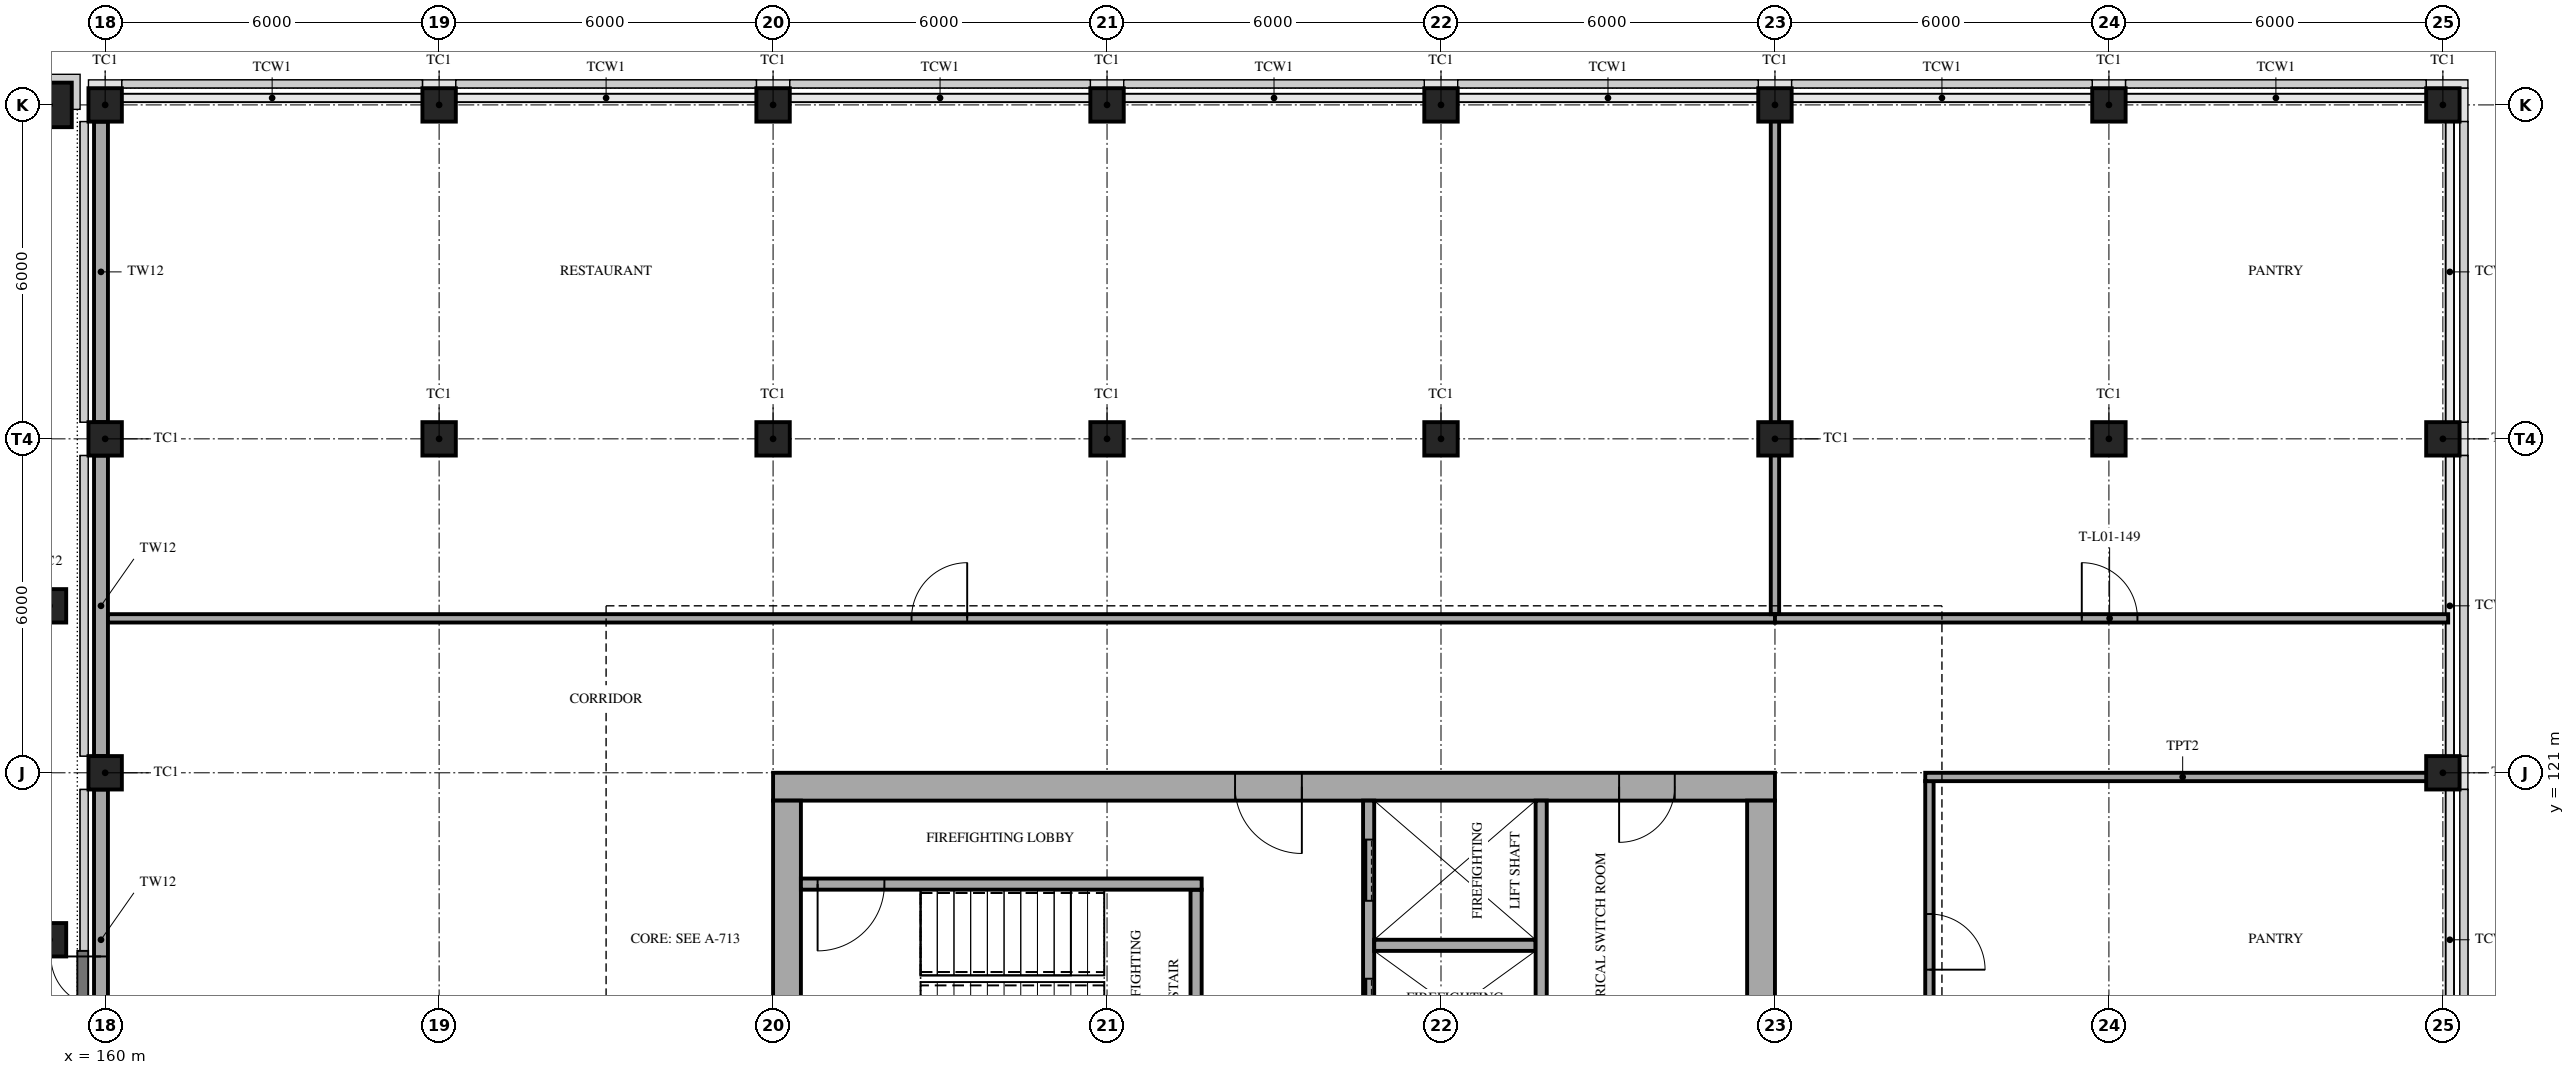
"""IFC4 building model, lengths in metres.
Left out: names, types, materials, properties, quantities, classifications, styles, units other than length and angle.
Written with IfcOpenShell. Run it as: python <this file> out.ifc"""

import sys

from ifc_helpers import new_model, si_unit, direction, frame, frame_2d, origin, origin_2d, place, context, subcontext, project, spatial, rectangle, hollow_rectangle, extrude, element, fill, save


model = new_model("IFC4")
c1 = context("Model", 3, precision=1e-05, world=origin(), true_north=direction((0.0, 1.0)))
c2 = subcontext(c1, "Body", "Model", "MODEL_VIEW")
j1 = project(units=[si_unit("LENGTHUNIT", "METRE"), si_unit("PLANEANGLEUNIT", "RADIAN")], contexts=[c1])
p1 = place(None, origin())
s1 = spatial("IfcSite", under=j1, at=p1, CompositionType="ELEMENT")
p2 = place(p1, origin())
s2 = spatial("IfcBuilding", under=s1, at=p2, CompositionType="ELEMENT")
p3 = place(p2, frame((0.0, 0.0, 5.0)))
s3 = spatial("IfcBuildingStorey", under=s2, at=p3, CompositionType="ELEMENT", Elevation=5.0)
for number, where, z_axis, x_axis in (
    (1, (160.0, 121.0, 0.0), (0.0, 0.0, 1.0), (1.0, 0.0, 0.0)),
    (2, (160.0, 127.0, 0.0), (0.0, 0.0, 1.0), (1.0, 0.0, 0.0)),
    (3, (160.0, 133.0, 0.0), (0.0, 0.0, 1.0), (1.0, 0.0, 0.0)),
    (4, (166.0, 133.0, 0.0), (0.0, 0.0, 1.0), (1.0, 0.0, 0.0)),
    (5, (172.0, 133.0, 0.0), (0.0, 0.0, 1.0), (1.0, 0.0, 0.0)),
    (6, (178.0, 133.0, 0.0), (0.0, 0.0, 1.0), (1.0, 0.0, 0.0)),
    (7, (184.0, 133.0, 0.0), (0.0, 0.0, 1.0), (1.0, 0.0, 0.0)),
    (8, (190.0, 133.0, 0.0), (0.0, 0.0, 1.0), (1.0, 0.0, 0.0)),
    (9, (196.0, 133.0, 0.0), (0.0, 0.0, 1.0), (1.0, 0.0, 0.0)),
    (10, (202.0, 121.0, 0.0), (0.0, 0.0, 1.0), (1.0, 0.0, 0.0)),
    (11, (202.0, 127.0, 0.0), (0.0, 0.0, 1.0), (1.0, 0.0, 0.0)),
    (12, (202.0, 133.0, 0.0), (0.0, 0.0, 1.0), (1.0, 0.0, 0.0)),
    (13, (166.0, 127.0, 0.0), (0.0, 0.0, 1.0), (1.0, 0.0, 0.0)),
    (14, (172.0, 127.0, 0.0), (0.0, 0.0, 1.0), (1.0, 0.0, 0.0)),
    (15, (178.0, 127.0, 0.0), (0.0, 0.0, 1.0), (1.0, 0.0, 0.0)),
    (16, (184.0, 127.0, 0.0), (0.0, 0.0, 1.0), (1.0, 0.0, 0.0)),
    (17, (190.0, 127.0, 0.0), (0.0, 0.0, 1.0), (1.0, 0.0, 0.0)),
    (18, (196.0, 127.0, 0.0), (0.0, 0.0, 1.0), (1.0, 0.0, 0.0)),
):
    element("IfcColumn", number, at=place(p3, frame(where, z_axis=z_axis, x_axis=x_axis)), inside=s3, PredefinedType="COLUMN", context=c2, shape_type="SweptSolid", body=[
        extrude(hollow_rectangle(XDim=0.6, YDim=0.6, WallThickness=0.04, at=origin_2d()), origin(), (0.0, 0.0, 1.0), 5.0),
    ])
p4 = place(p3, frame((172.0, 120.75, 0.0), z_axis=(0.0, 0.0, 1.0), x_axis=(1.0, 0.0, 0.0)))
e19 = element("IfcWall", 19, at=p4, inside=s3, PredefinedType="SHEAR", context=c2, shape_type="SweptSolid", body=[
    extrude(rectangle(XDim=18.0, YDim=0.5, at=frame_2d((9.0, 0.0))), origin(), (0.0, 0.0, 1.0), 5.0),
])
p5 = place(p4, frame((8.3, 0.0, 0.0)))
e20 = element("IfcOpeningElement", 20, at=p5, cuts=e19, PredefinedType="OPENING", context=c2, shape_type="SweptSolid", body=[
    extrude(rectangle(XDim=1.2, YDim=2.1, at=frame_2d((0.6, 1.05))), frame((0.0, 0.26, 0.0), z_axis=(0.0, -1.0, 0.0), x_axis=(1.0, 0.0, 0.0)), (0.0, 0.0, 1.0), 0.52),
])
p6 = place(p4, frame((15.2, 0.0, 0.0)))
e21 = element("IfcOpeningElement", 21, at=p6, cuts=e19, PredefinedType="OPENING", context=c2, shape_type="SweptSolid", body=[
    extrude(rectangle(XDim=1.0, YDim=2.1, at=frame_2d((0.5, 1.05))), frame((0.0, 0.26, 0.0), z_axis=(0.0, -1.0, 0.0), x_axis=(1.0, 0.0, 0.0)), (0.0, 0.0, 1.0), 0.52),
])
p7 = place(p3, frame((172.25, 103.5, 0.0), z_axis=(0.0, 0.0, 1.0), x_axis=(0.0, 1.0, 0.0)))
e22 = element("IfcWall", 22, at=p7, inside=s3, PredefinedType="SHEAR", context=c2, shape_type="SweptSolid", body=[
    extrude(rectangle(XDim=17.0, YDim=0.5, at=frame_2d((8.5, 0.0))), origin(), (0.0, 0.0, 1.0), 5.0),
])
p8 = place(p7, frame((7.2, 0.0, 0.0)))
e23 = element("IfcOpeningElement", 23, at=p8, cuts=e22, PredefinedType="OPENING", context=c2, shape_type="SweptSolid", body=[
    extrude(rectangle(XDim=1.4, YDim=2.1, at=frame_2d((0.7, 1.05))), frame((0.0, 0.26, 0.0), z_axis=(0.0, -1.0, 0.0), x_axis=(1.0, 0.0, 0.0)), (0.0, 0.0, 1.0), 0.52),
])
p9 = place(p3, frame((189.75, 103.5, 0.0), z_axis=(0.0, 0.0, 1.0), x_axis=(0.0, 1.0, 0.0)))
e24 = element("IfcWall", 24, at=p9, inside=s3, PredefinedType="SHEAR", context=c2, shape_type="SweptSolid", body=[
    extrude(rectangle(XDim=17.0, YDim=0.5, at=frame_2d((8.5, 0.0))), origin(), (0.0, 0.0, 1.0), 5.0),
])
p10 = place(p9, frame((7.2, 0.0, 0.0)))
e25 = element("IfcOpeningElement", 25, at=p10, cuts=e24, PredefinedType="OPENING", context=c2, shape_type="SweptSolid", body=[
    extrude(rectangle(XDim=1.4, YDim=2.1, at=frame_2d((0.7, 1.05))), frame((0.0, 0.26, 0.0), z_axis=(0.0, -1.0, 0.0), x_axis=(1.0, 0.0, 0.0)), (0.0, 0.0, 1.0), 0.52),
])
for number, where, z_axis, x_axis in (
    (26, (159.0, 118.0, 0.0), (0.0, 0.0, 1.0), (1.0, 0.0, 0.0)),
    (27, (159.0, 124.0, 0.0), (0.0, 0.0, 1.0), (1.0, 0.0, 0.0)),
):
    element("IfcColumn", number, at=place(p3, frame(where, z_axis=z_axis, x_axis=x_axis)), inside=s3, PredefinedType="COLUMN", context=c2, shape_type="SweptSolid", body=[
        extrude(rectangle(XDim=0.6, YDim=0.6, at=origin_2d()), origin(), (0.0, 0.0, 1.0), 5.0),
    ])
p11 = place(p3, frame((159.0, 133.0, 0.0), z_axis=(0.0, 0.0, 1.0), x_axis=(1.0, 0.0, 0.0)))
e28 = element("IfcColumn", 28, at=p11, inside=s3, PredefinedType="COLUMN", context=c2, shape_type="SweptSolid", body=[
    extrude(rectangle(XDim=0.8, YDim=0.8, at=origin_2d()), origin(), (0.0, 0.0, 1.0), 5.0),
])
p12 = place(p3, frame((159.925, 115.3, 0.0), z_axis=(0.0, 0.0, 1.0), x_axis=(0.0, 1.0, 0.0)))
e29 = element("IfcWall", 29, at=p12, inside=s3, PredefinedType="SOLIDWALL", context=c2, shape_type="SweptSolid", body=[
    extrude(rectangle(XDim=5.4, YDim=0.25, at=frame_2d((2.7, 0.0))), origin(), (0.0, 0.0, 1.0), 4.35),
])
p13 = place(p12, frame((0.6, 0.0, 0.0)))
e30 = element("IfcOpeningElement", 30, at=p13, cuts=e29, PredefinedType="OPENING", context=c2, shape_type="SweptSolid", body=[
    extrude(rectangle(XDim=1.8, YDim=2.1, at=frame_2d((0.9, 1.05))), frame((0.0, 0.135, 0.0), z_axis=(0.0, -1.0, 0.0), x_axis=(1.0, 0.0, 0.0)), (0.0, 0.0, 1.0), 0.27),
])
for number, where, z_axis, x_axis in (
    (31, (159.925, 121.3, 0.0), (0.0, 0.0, 1.0), (0.0, 1.0, 0.0)),
    (32, (159.925, 127.3, 0.0), (0.0, 0.0, 1.0), (0.0, 1.0, 0.0)),
):
    element("IfcWall", number, at=place(p3, frame(where, z_axis=z_axis, x_axis=x_axis)), inside=s3, PredefinedType="SOLIDWALL", context=c2, shape_type="SweptSolid", body=[
        extrude(rectangle(XDim=5.4, YDim=0.25, at=frame_2d((2.7, 0.0))), origin(), (0.0, 0.0, 1.0), 4.35),
    ])
p14 = place(p3, frame((179.6, 115.7, 0.0), z_axis=(0.0, 0.0, 1.0), x_axis=(0.0, 1.0, 0.0)))
e33 = element("IfcWall", 33, at=p14, inside=s3, PredefinedType="SOLIDWALL", context=c2, shape_type="SweptSolid", body=[
    extrude(rectangle(XDim=3.2, YDim=0.2, at=frame_2d((1.6, 0.0))), origin(), (0.0, 0.0, 1.0), 4.8),
])
p15 = place(p3, frame((172.5, 119.0, 0.0), z_axis=(0.0, 0.0, 1.0), x_axis=(1.0, 0.0, 0.0)))
e34 = element("IfcWall", 34, at=p15, inside=s3, PredefinedType="SOLIDWALL", context=c2, shape_type="SweptSolid", body=[
    extrude(rectangle(XDim=7.2, YDim=0.2, at=frame_2d((3.6, 0.0))), origin(), (0.0, 0.0, 1.0), 4.8),
])
p16 = place(p15, frame((0.3, 0.0, 0.0)))
e35 = element("IfcOpeningElement", 35, at=p16, cuts=e34, PredefinedType="OPENING", context=c2, shape_type="SweptSolid", body=[
    extrude(rectangle(XDim=1.2, YDim=2.1, at=frame_2d((0.6, 1.05))), frame((0.0, 0.11, 0.0), z_axis=(0.0, -1.0, 0.0), x_axis=(1.0, 0.0, 0.0)), (0.0, 0.0, 1.0), 0.22),
])
p17 = place(p3, frame((182.7, 115.7, 0.0), z_axis=(0.0, 0.0, 1.0), x_axis=(0.0, 1.0, 0.0)))
e36 = element("IfcWall", 36, at=p17, inside=s3, PredefinedType="SOLIDWALL", context=c2, shape_type="SweptSolid", body=[
    extrude(rectangle(XDim=4.8, YDim=0.2, at=frame_2d((2.4, 0.0))), origin(), (0.0, 0.0, 1.0), 4.8),
])
p18 = place(p17, frame((0.5, 0.0, 0.0)))
e37 = element("IfcOpeningElement", 37, at=p18, cuts=e36, PredefinedType="OPENING", context=c2, shape_type="SweptSolid", body=[
    extrude(rectangle(XDim=1.1, YDim=2.1, at=frame_2d((0.55, 1.05))), frame((0.0, 0.11, 0.0), z_axis=(0.0, -1.0, 0.0), x_axis=(1.0, 0.0, 0.0)), (0.0, 0.0, 1.0), 0.22),
])
p19 = place(p17, frame((3.0, 0.0, 0.0)))
e38 = element("IfcOpeningElement", 38, at=p19, cuts=e36, PredefinedType="OPENING", context=c2, shape_type="SweptSolid", body=[
    extrude(rectangle(XDim=1.1, YDim=2.1, at=frame_2d((0.55, 1.05))), frame((0.0, 0.11, 0.0), z_axis=(0.0, -1.0, 0.0), x_axis=(1.0, 0.0, 0.0)), (0.0, 0.0, 1.0), 0.22),
])
p20 = place(p3, frame((182.8, 117.9, 0.0), z_axis=(0.0, 0.0, 1.0), x_axis=(1.0, 0.0, 0.0)))
e39 = element("IfcWall", 39, at=p20, inside=s3, PredefinedType="SOLIDWALL", context=c2, shape_type="SweptSolid", body=[
    extrude(rectangle(XDim=2.9, YDim=0.2, at=frame_2d((1.45, 0.0))), origin(), (0.0, 0.0, 1.0), 4.8),
])
p21 = place(p3, frame((185.8, 115.7, 0.0), z_axis=(0.0, 0.0, 1.0), x_axis=(0.0, 1.0, 0.0)))
e40 = element("IfcWall", 40, at=p21, inside=s3, PredefinedType="SOLIDWALL", context=c2, shape_type="SweptSolid", body=[
    extrude(rectangle(XDim=4.8, YDim=0.2, at=frame_2d((2.4, 0.0))), origin(), (0.0, 0.0, 1.0), 4.8),
])
p22 = place(p3, frame((160.05, 123.775, 0.0), z_axis=(0.0, 0.0, 1.0), x_axis=(1.0, 0.0, 0.0)))
e41 = element("IfcWall", 41, at=p22, inside=s3, PredefinedType="PARTITIONING", context=c2, shape_type="SweptSolid", body=[
    extrude(rectangle(XDim=29.95, YDim=0.15, at=frame_2d((14.975, 0.0))), origin(), (0.0, 0.0, 1.0), 4.2),
])
p23 = place(p22, frame((14.438, 0.0, 0.0)))
e42 = element("IfcOpeningElement", 42, at=p23, cuts=e41, PredefinedType="OPENING", context=c2, shape_type="SweptSolid", body=[
    extrude(rectangle(XDim=1.0, YDim=2.1, at=frame_2d((0.5, 1.05))), frame((0.0, 0.085, 0.0), z_axis=(0.0, -1.0, 0.0), x_axis=(1.0, 0.0, 0.0)), (0.0, 0.0, 1.0), 0.17),
])
p24 = place(p3, frame((190.0, 123.85, 0.0), z_axis=(0.0, 0.0, 1.0), x_axis=(0.0, 1.0, 0.0)))
e43 = element("IfcWall", 43, at=p24, inside=s3, PredefinedType="PARTITIONING", context=c2, shape_type="SweptSolid", body=[
    extrude(rectangle(XDim=9.1, YDim=0.15, at=frame_2d((4.55, 0.0))), origin(), (0.0, 0.0, 1.0), 4.2),
])
p25 = place(p3, frame((190.0, 123.775, 0.0), z_axis=(0.0, 0.0, 1.0), x_axis=(1.0, 0.0, 0.0)))
e44 = element("IfcWall", 44, at=p25, inside=s3, PredefinedType="PARTITIONING", context=c2, shape_type="SweptSolid", body=[
    extrude(rectangle(XDim=12.095, YDim=0.15, at=frame_2d((6.047, 0.0))), origin(), (0.0, 0.0, 1.0), 4.2),
])
p26 = place(p25, frame((5.512, 0.0, 0.0)))
e45 = element("IfcOpeningElement", 45, at=p26, cuts=e44, PredefinedType="OPENING", context=c2, shape_type="SweptSolid", body=[
    extrude(rectangle(XDim=1.0, YDim=2.1, at=frame_2d((0.5, 1.05))), frame((0.0, 0.085, 0.0), z_axis=(0.0, -1.0, 0.0), x_axis=(1.0, 0.0, 0.0)), (0.0, 0.0, 1.0), 0.17),
])
p27 = place(p3, frame((192.775, 115.0, 0.0), z_axis=(0.0, 0.0, 1.0), x_axis=(0.0, 1.0, 0.0)))
e46 = element("IfcWall", 46, at=p27, inside=s3, PredefinedType="PARTITIONING", context=c2, shape_type="SweptSolid", body=[
    extrude(rectangle(XDim=5.85, YDim=0.15, at=frame_2d((2.925, 0.0))), origin(), (0.0, 0.0, 1.0), 4.2),
])
p28 = place(p27, frame((2.462, 0.0, 0.0)))
e47 = element("IfcOpeningElement", 47, at=p28, cuts=e46, PredefinedType="OPENING", context=c2, shape_type="SweptSolid", body=[
    extrude(rectangle(XDim=1.0, YDim=2.1, at=frame_2d((0.5, 1.05))), frame((0.0, 0.085, 0.0), z_axis=(0.0, -1.0, 0.0), x_axis=(1.0, 0.0, 0.0)), (0.0, 0.0, 1.0), 0.17),
])
p29 = place(p3, frame((192.7, 120.925, 0.0), z_axis=(0.0, 0.0, 1.0), x_axis=(1.0, 0.0, 0.0)))
e48 = element("IfcWall", 48, at=p29, inside=s3, PredefinedType="PARTITIONING", context=c2, shape_type="SweptSolid", body=[
    extrude(rectangle(XDim=9.25, YDim=0.15, at=frame_2d((4.625, 0.0))), origin(), (0.0, 0.0, 1.0), 4.2),
])
p30 = place(p13, origin())
e49 = element("IfcDoor", 49, at=p30, inside=s3, OperationType="DOUBLE_DOOR_SINGLE_SWING", PredefinedType="DOOR", context=c2, shape_type="SweptSolid", body=[
    extrude(rectangle(XDim=1.8, YDim=2.1, at=frame_2d((0.9, 1.05))), frame((0.0, 0.025, 0.0), z_axis=(0.0, -1.0, 0.0), x_axis=(1.0, 0.0, 0.0)), (0.0, 0.0, 1.0), 0.05),
])
fill(e30, e49)
p31 = place(p5, frame((1.2, 0.0, 0.0), z_axis=(0.0, 0.0, 1.0), x_axis=(-1.0, 0.0, 0.0)))
e50 = element("IfcDoor", 50, at=p31, inside=s3, OperationType="SINGLE_SWING_LEFT", PredefinedType="DOOR", context=c2, shape_type="SweptSolid", body=[
    extrude(rectangle(XDim=1.2, YDim=2.1, at=frame_2d((0.6, 1.05))), frame((0.0, 0.025, 0.0), z_axis=(0.0, -1.0, 0.0), x_axis=(1.0, 0.0, 0.0)), (0.0, 0.0, 1.0), 0.05),
])
fill(e20, e50)
p32 = place(p6, frame((1.0, 0.0, 0.0), z_axis=(0.0, 0.0, 1.0), x_axis=(-1.0, 0.0, 0.0)))
e51 = element("IfcDoor", 51, at=p32, inside=s3, OperationType="SINGLE_SWING_RIGHT", PredefinedType="DOOR", context=c2, shape_type="SweptSolid", body=[
    extrude(rectangle(XDim=1.0, YDim=2.1, at=frame_2d((0.5, 1.05))), frame((0.0, 0.025, 0.0), z_axis=(0.0, -1.0, 0.0), x_axis=(1.0, 0.0, 0.0)), (0.0, 0.0, 1.0), 0.05),
])
fill(e21, e51)
p33 = place(p18, origin())
e52 = element("IfcDoor", 52, at=p33, inside=s3, OperationType="SLIDING_TO_LEFT", PredefinedType="DOOR", context=c2, shape_type="SweptSolid", body=[
    extrude(rectangle(XDim=1.1, YDim=2.1, at=frame_2d((0.55, 1.05))), frame((0.0, 0.025, 0.0), z_axis=(0.0, -1.0, 0.0), x_axis=(1.0, 0.0, 0.0)), (0.0, 0.0, 1.0), 0.05),
])
fill(e37, e52)
p34 = place(p19, origin())
e53 = element("IfcDoor", 53, at=p34, inside=s3, OperationType="SLIDING_TO_LEFT", PredefinedType="DOOR", context=c2, shape_type="SweptSolid", body=[
    extrude(rectangle(XDim=1.1, YDim=2.1, at=frame_2d((0.55, 1.05))), frame((0.0, 0.025, 0.0), z_axis=(0.0, -1.0, 0.0), x_axis=(1.0, 0.0, 0.0)), (0.0, 0.0, 1.0), 0.05),
])
fill(e38, e53)
p35 = place(p16, frame((1.2, 0.0, 0.0), z_axis=(0.0, 0.0, 1.0), x_axis=(-1.0, 0.0, 0.0)))
e54 = element("IfcDoor", 54, at=p35, inside=s3, OperationType="SINGLE_SWING_RIGHT", PredefinedType="DOOR", context=c2, shape_type="SweptSolid", body=[
    extrude(rectangle(XDim=1.2, YDim=2.1, at=frame_2d((0.6, 1.05))), frame((0.0, 0.025, 0.0), z_axis=(0.0, -1.0, 0.0), x_axis=(1.0, 0.0, 0.0)), (0.0, 0.0, 1.0), 0.05),
])
fill(e35, e54)
p36 = place(p23, origin())
e55 = element("IfcDoor", 55, at=p36, inside=s3, OperationType="SINGLE_SWING_RIGHT", PredefinedType="DOOR", context=c2, shape_type="SweptSolid", body=[
    extrude(rectangle(XDim=1.0, YDim=2.1, at=frame_2d((0.5, 1.05))), frame((0.0, 0.025, 0.0), z_axis=(0.0, -1.0, 0.0), x_axis=(1.0, 0.0, 0.0)), (0.0, 0.0, 1.0), 0.05),
])
fill(e42, e55)
p37 = place(p26, origin())
e56 = element("IfcDoor", 56, at=p37, inside=s3, OperationType="SINGLE_SWING_LEFT", PredefinedType="DOOR", context=c2, shape_type="SweptSolid", body=[
    extrude(rectangle(XDim=1.0, YDim=2.1, at=frame_2d((0.5, 1.05))), frame((0.0, 0.025, 0.0), z_axis=(0.0, -1.0, 0.0), x_axis=(1.0, 0.0, 0.0)), (0.0, 0.0, 1.0), 0.05),
])
fill(e45, e56)
p38 = place(p28, frame((1.0, 0.0, 0.0), z_axis=(0.0, 0.0, 1.0), x_axis=(-1.0, 0.0, 0.0)))
e57 = element("IfcDoor", 57, at=p38, inside=s3, OperationType="SINGLE_SWING_RIGHT", PredefinedType="DOOR", context=c2, shape_type="SweptSolid", body=[
    extrude(rectangle(XDim=1.0, YDim=2.1, at=frame_2d((0.5, 1.05))), frame((0.0, 0.025, 0.0), z_axis=(0.0, -1.0, 0.0), x_axis=(1.0, 0.0, 0.0)), (0.0, 0.0, 1.0), 0.05),
])
fill(e47, e57)
save(model, sys.argv[1])
